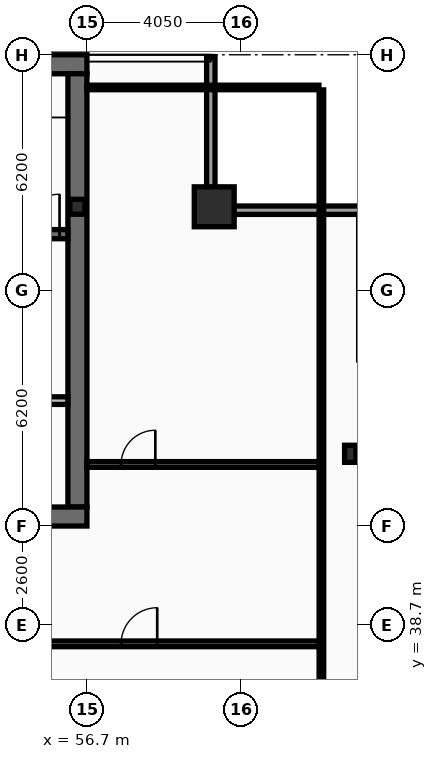
"""IFC4 building model, lengths in metres.
Left out: names, types, materials, properties, quantities, classifications, styles, units other than length and angle.
Written with IfcOpenShell. Run it as: python <this file> out.ifc"""

import sys

from ifc_helpers import new_model, si_unit, direction, frame, frame_2d, origin, origin_2d, place, context, subcontext, project, spatial, rectangle, hollow_rectangle, i_section, extrude, element, fill, save


model = new_model("IFC4")
c1 = context("Model", 3, precision=1e-05, world=origin(), true_north=direction((0.0, 1.0)))
c2 = subcontext(c1, "Body", "Model", "MODEL_VIEW")
j1 = project(units=[si_unit("LENGTHUNIT", "METRE"), si_unit("PLANEANGLEUNIT", "RADIAN")], contexts=[c1])
p1 = place(None, origin())
s1 = spatial("IfcSite", under=j1, at=p1, CompositionType="ELEMENT")
p2 = place(p1, origin())
s2 = spatial("IfcBuilding", under=s1, at=p2, CompositionType="ELEMENT")
p3 = place(p2, frame((0.0, 0.0, 269.8)))
s3 = spatial("IfcBuildingStorey", under=s2, at=p3, CompositionType="ELEMENT", Elevation=269.8)
p4 = place(p3, frame((16.2, 53.45, 0.0), z_axis=(0.0, 0.0, 1.0), x_axis=(1.0, 0.0, 0.0)))
e1 = element("IfcWall", 1, at=p4, inside=s3, PredefinedType="SHEAR", context=c2, shape_type="SweptSolid", body=[
    extrude(rectangle(XDim=40.5, YDim=0.5, at=frame_2d((20.25, 0.0))), origin(), (0.0, 0.0, 1.0), 3.44),
])
p5 = place(p3, frame((56.45, 53.2, 0.0), z_axis=(0.0, 0.0, 1.0), x_axis=(0.0, -1.0, 0.0)))
e2 = element("IfcWall", 2, at=p5, inside=s3, PredefinedType="SHEAR", context=c2, shape_type="SweptSolid", body=[
    extrude(rectangle(XDim=11.4, YDim=0.5, at=frame_2d((5.7, 0.0))), origin(), (0.0, 0.0, 1.0), 3.44),
])
p6 = place(p3, frame((56.7, 41.55, 0.0), z_axis=(0.0, 0.0, 1.0), x_axis=(-1.0, 0.0, 0.0)))
e3 = element("IfcWall", 3, at=p6, inside=s3, PredefinedType="SHEAR", context=c2, shape_type="SweptSolid", body=[
    extrude(rectangle(XDim=2.45, YDim=0.5, at=frame_2d((1.225, 0.0))), origin(), (0.0, 0.0, 1.0), 3.44),
])
p7 = place(p3, frame((48.63, 48.98, 0.0), z_axis=(0.0, 0.0, 1.0), x_axis=(1.0, 0.0, 0.0)))
e4 = element("IfcWall", 4, at=p7, inside=s3, PredefinedType="SHEAR", context=c2, shape_type="SweptSolid", body=[
    extrude(rectangle(XDim=7.57, YDim=0.24, at=frame_2d((3.785, 0.0))), origin(), (0.0, 0.0, 1.0), 3.44),
])
p8 = place(p7, frame((6.3, 0.0, 0.0)))
e5 = element("IfcOpeningElement", 5, at=p8, cuts=e4, PredefinedType="OPENING", context=c2, shape_type="SweptSolid", body=[
    extrude(rectangle(XDim=1.05, YDim=2.15, at=frame_2d((0.525, 1.075))), frame((0.0, 0.13, 0.0), z_axis=(0.0, -1.0, 0.0), x_axis=(1.0, 0.0, 0.0)), (0.0, 0.0, 1.0), 0.26),
])
p9 = place(p3, frame((60.05, 49.7, 0.0), z_axis=(0.0, 0.0, 1.0), x_axis=(1.0, 0.0, 0.0)))
e6 = element("IfcColumn", 6, at=p9, inside=s3, PredefinedType="COLUMN", context=c2, shape_type="SweptSolid", body=[
    extrude(hollow_rectangle(XDim=1.05, YDim=1.05, WallThickness=0.055, at=origin_2d()), origin(), (0.0, 0.0, 1.0), 3.6),
])
p10 = place(p3, frame((63.63, 43.2, 0.0), z_axis=(0.0, 0.0, 1.0), x_axis=(1.0, 0.0, 0.0)))
e7 = element("IfcColumn", 7, at=p10, inside=s3, PredefinedType="COLUMN", context=c2, shape_type="SweptSolid", body=[
    extrude(i_section(OverallWidth=0.3, OverallDepth=0.45, WebThickness=0.014, FlangeThickness=0.026, at=origin_2d()), origin(), (0.0, 0.0, 1.0), 3.6),
])
p11 = place(p3, frame((56.45, 49.7, 0.0), z_axis=(0.0, 0.0, 1.0), x_axis=(1.0, 0.0, 0.0)))
e8 = element("IfcColumn", 8, at=p11, inside=s3, PredefinedType="COLUMN", context=c2, shape_type="SweptSolid", body=[
    extrude(i_section(OverallWidth=0.399, OverallDepth=0.393, WebThickness=0.023, FlangeThickness=0.037, at=origin_2d()), origin(), (0.0, 0.0, 1.0), 3.6),
])
p12 = place(p3, frame((59.96, 53.63, 0.0), z_axis=(0.0, 0.0, 1.0), x_axis=(0.0, -1.0, 0.0)))
e9 = element("IfcWall", 9, at=p12, inside=s3, PredefinedType="SOLIDWALL", context=c2, shape_type="SweptSolid", body=[
    extrude(rectangle(XDim=3.91, YDim=0.22, at=frame_2d((1.955, 0.0))), origin(), (0.0, 0.0, 1.0), 2.88),
])
p13 = place(p3, frame((59.85, 49.61, 0.0), z_axis=(0.0, 0.0, 1.0), x_axis=(1.0, 0.0, 0.0)))
e10 = element("IfcWall", 10, at=p13, inside=s3, PredefinedType="SOLIDWALL", context=c2, shape_type="SweptSolid", body=[
    extrude(rectangle(XDim=4.22, YDim=0.22, at=frame_2d((2.11, 0.0))), origin(), (0.0, 0.0, 1.0), 2.88),
])
p14 = place(p3, frame((51.9, 44.6, 0.0), z_axis=(0.0, 0.0, 1.0), x_axis=(1.0, 0.0, 0.0)))
e11 = element("IfcWall", 11, at=p14, inside=s3, PredefinedType="PARTITIONING", context=c2, shape_type="SweptSolid", body=[
    extrude(rectangle(XDim=4.3, YDim=0.2, at=frame_2d((2.15, 0.0))), origin(), (0.0, 0.0, 1.0), 3.44),
])
p15 = place(p14, frame((1.15, 0.0, 0.0)))
e12 = element("IfcOpeningElement", 12, at=p15, cuts=e11, PredefinedType="OPENING", context=c2, shape_type="SweptSolid", body=[
    extrude(rectangle(XDim=1.05, YDim=2.15, at=frame_2d((0.525, 1.075))), frame((0.0, 0.11, 0.0), z_axis=(0.0, -1.0, 0.0), x_axis=(1.0, 0.0, 0.0)), (0.0, 0.0, 1.0), 0.22),
])
p16 = place(p3, frame((54.35, 38.2, 0.0), z_axis=(0.0, 0.0, 1.0), x_axis=(1.0, 0.0, 0.0)))
e13 = element("IfcWall", 13, at=p16, inside=s3, PredefinedType="PARTITIONING", context=c2, shape_type="SweptSolid", body=[
    extrude(rectangle(XDim=8.52, YDim=0.15, at=frame_2d((4.26, 0.0))), origin(), (0.0, 0.0, 1.0), 2.78),
])
p17 = place(p16, frame((3.25, 0.0, 0.0)))
e14 = element("IfcOpeningElement", 14, at=p17, cuts=e13, PredefinedType="OPENING", context=c2, shape_type="SweptSolid", body=[
    extrude(rectangle(XDim=0.95, YDim=2.05, at=frame_2d((0.475, 1.025))), frame((0.0, 0.085, 0.0), z_axis=(0.0, -1.0, 0.0), x_axis=(1.0, 0.0, 0.0)), (0.0, 0.0, 1.0), 0.17),
])
p18 = place(p3, frame((56.7, 42.92, 0.0), z_axis=(0.0, 0.0, 1.0), x_axis=(1.0, 0.0, 0.0)))
e15 = element("IfcWall", 15, at=p18, inside=s3, PredefinedType="PARTITIONING", context=c2, shape_type="SweptSolid", body=[
    extrude(rectangle(XDim=6.105, YDim=0.15, at=frame_2d((3.052, 0.0))), origin(), (0.0, 0.0, 1.0), 2.78),
])
p19 = place(p18, frame((0.9, 0.0, 0.0)))
e16 = element("IfcOpeningElement", 16, at=p19, cuts=e15, PredefinedType="OPENING", context=c2, shape_type="SweptSolid", body=[
    extrude(rectangle(XDim=0.9, YDim=2.05, at=frame_2d((0.45, 1.025))), frame((0.0, 0.085, 0.0), z_axis=(0.0, -1.0, 0.0), x_axis=(1.0, 0.0, 0.0)), (0.0, 0.0, 1.0), 0.17),
])
p20 = place(p3, frame((62.87, 10.665, 0.0), z_axis=(0.0, 0.0, 1.0), x_axis=(0.0, 1.0, 0.0)))
e17 = element("IfcWall", 17, at=p20, inside=s3, PredefinedType="PARTITIONING", context=c2, shape_type="SweptSolid", body=[
    extrude(rectangle(XDim=42.11, YDim=0.12, at=frame_2d((21.055, 0.0))), origin(), (0.0, 0.0, 1.0), 2.78),
])
p21 = place(p3, frame((56.7, 52.84, 0.0), z_axis=(0.0, 0.0, 1.0), x_axis=(1.0, 0.0, 0.0)))
e18 = element("IfcWall", 18, at=p21, inside=s3, PredefinedType="PARTITIONING", context=c2, shape_type="SweptSolid", body=[
    extrude(rectangle(XDim=6.105, YDim=0.12, at=frame_2d((3.052, 0.0))), origin(), (0.0, 0.0, 1.0), 3.44),
])
p22 = place(p8, origin())
e19 = element("IfcDoor", 19, at=p22, inside=s3, OperationType="SINGLE_SWING_RIGHT", PredefinedType="DOOR", context=c2, shape_type="SweptSolid", body=[
    extrude(rectangle(XDim=1.05, YDim=2.15, at=frame_2d((0.525, 1.075))), frame((0.0, 0.025, 0.0), z_axis=(0.0, -1.0, 0.0), x_axis=(1.0, 0.0, 0.0)), (0.0, 0.0, 1.0), 0.05),
])
fill(e5, e19)
p23 = place(p17, origin())
e20 = element("IfcDoor", 20, at=p23, inside=s3, OperationType="SINGLE_SWING_RIGHT", PredefinedType="DOOR", context=c2, shape_type="SweptSolid", body=[
    extrude(rectangle(XDim=0.95, YDim=2.05, at=frame_2d((0.475, 1.025))), frame((0.0, 0.025, 0.0), z_axis=(0.0, -1.0, 0.0), x_axis=(1.0, 0.0, 0.0)), (0.0, 0.0, 1.0), 0.05),
])
fill(e14, e20)
p24 = place(p19, origin())
e21 = element("IfcDoor", 21, at=p24, inside=s3, OperationType="SINGLE_SWING_RIGHT", PredefinedType="DOOR", context=c2, shape_type="SweptSolid", body=[
    extrude(rectangle(XDim=0.9, YDim=2.05, at=frame_2d((0.45, 1.025))), frame((0.0, 0.025, 0.0), z_axis=(0.0, -1.0, 0.0), x_axis=(1.0, 0.0, 0.0)), (0.0, 0.0, 1.0), 0.05),
])
fill(e16, e21)
save(model, sys.argv[1])
